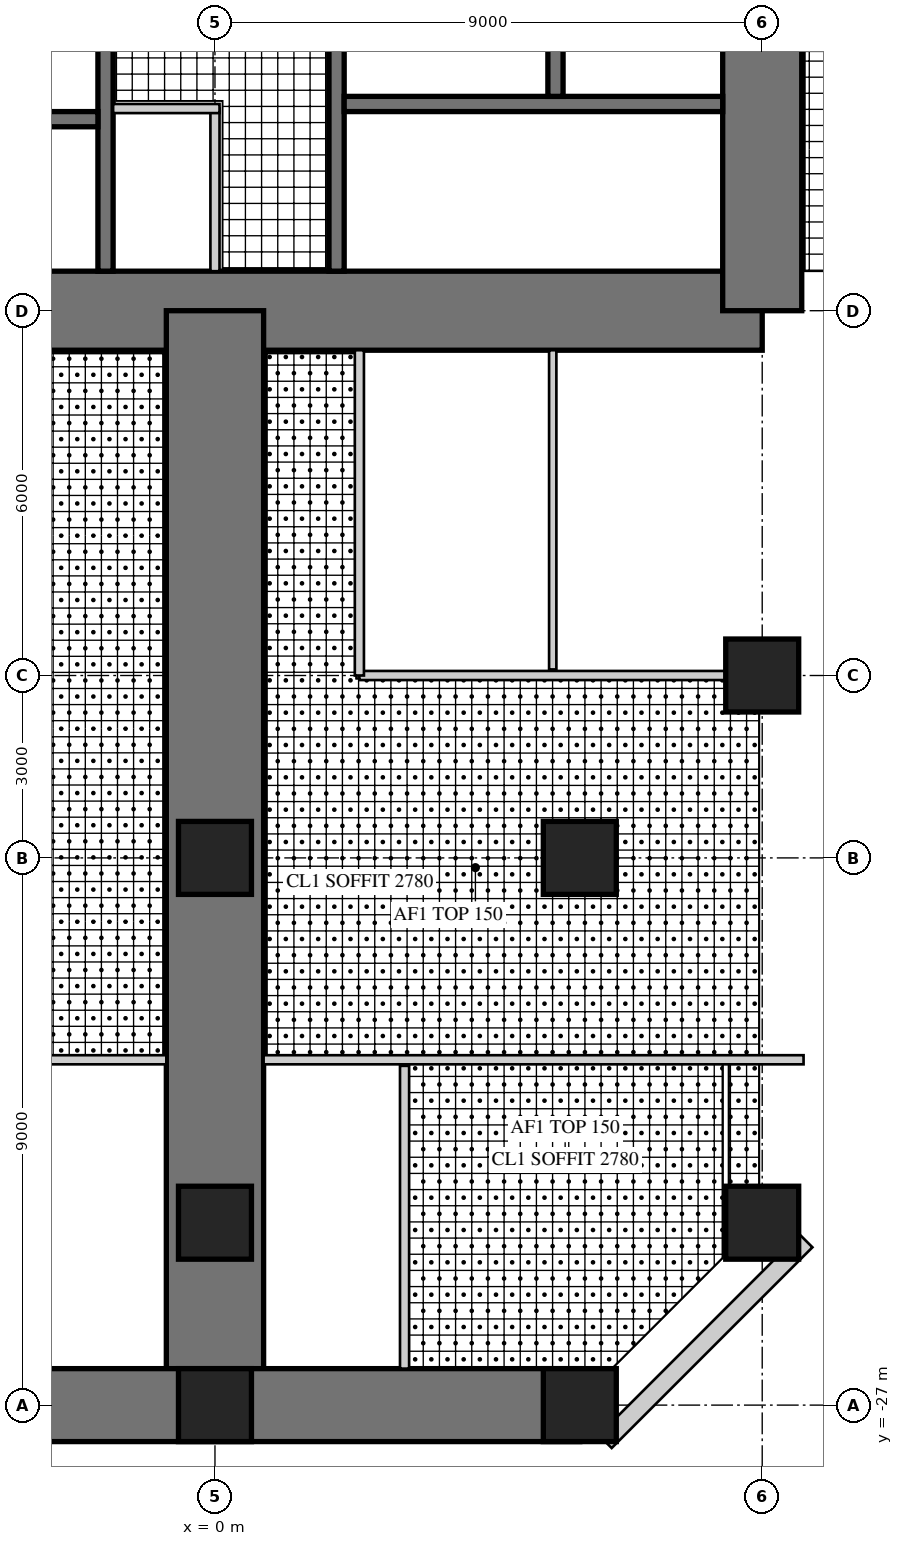
"""IFC4 building model, lengths in metres.
Left out: names, types, materials, properties, quantities, classifications, styles, units other than length and angle.
Written with IfcOpenShell. Run it as: python <this file> out.ifc"""

import sys

from ifc_helpers import new_model, si_unit, direction, frame, frame_2d, origin, origin_2d, place, context, subcontext, project, spatial, rectangle, hollow_rectangle, extrude, element, fill, save


model = new_model("IFC4")
c1 = context("Model", 3, precision=1e-05, world=origin(), true_north=direction((0.0, 1.0)))
c2 = subcontext(c1, "Body", "Model", "MODEL_VIEW")
j1 = project(units=[si_unit("LENGTHUNIT", "METRE"), si_unit("PLANEANGLEUNIT", "RADIAN")], contexts=[c1])
p1 = place(None, origin())
s1 = spatial("IfcSite", under=j1, at=p1, CompositionType="ELEMENT")
p2 = place(p1, origin())
s2 = spatial("IfcBuilding", under=s1, at=p2, CompositionType="ELEMENT")
p3 = place(p2, frame((0.0, 0.0, 27.5)))
s3 = spatial("IfcBuildingStorey", under=s2, at=p3, CompositionType="ELEMENT", Elevation=27.5)
p4 = place(p3, frame((-9.0, -9.0, 0.0), z_axis=(0.0, 0.0, 1.0), x_axis=(1.0, 0.0, 0.0)))
e1 = element("IfcWall", 1, at=p4, inside=s3, PredefinedType="SHEAR", context=c2, shape_type="SweptSolid", body=[
    extrude(rectangle(XDim=18.0, YDim=1.3, at=frame_2d((9.0, 0.0))), origin(), (0.0, 0.0, 1.0), 4.0),
])
p5 = place(p4, frame((9.8, 0.0, 0.0)))
e2 = element("IfcOpeningElement", 2, at=p5, cuts=e1, PredefinedType="OPENING", context=c2, shape_type="SweptSolid", body=[
    extrude(rectangle(XDim=1.0, YDim=2.4, at=frame_2d((0.5, 1.2))), frame((0.0, 0.66, 0.0), z_axis=(0.0, -1.0, 0.0), x_axis=(1.0, 0.0, 0.0)), (0.0, 0.0, 1.0), 1.32),
])
p6 = place(p3, frame((9.0, -9.0, 0.0), z_axis=(0.0, 0.0, 1.0), x_axis=(0.0, 1.0, 0.0)))
e3 = element("IfcWall", 3, at=p6, inside=s3, PredefinedType="SHEAR", context=c2, shape_type="SweptSolid", body=[
    extrude(rectangle(XDim=18.0, YDim=1.3, at=frame_2d((9.0, 0.0))), origin(), (0.0, 0.0, 1.0), 4.0),
])
p7 = place(p6, frame((9.8, 0.0, 0.0)))
e4 = element("IfcOpeningElement", 4, at=p7, cuts=e3, PredefinedType="OPENING", context=c2, shape_type="SweptSolid", body=[
    extrude(rectangle(XDim=1.0, YDim=2.4, at=frame_2d((0.5, 1.2))), frame((0.0, 0.66, 0.0), z_axis=(0.0, -1.0, 0.0), x_axis=(1.0, 0.0, 0.0)), (0.0, 0.0, 1.0), 1.32),
])
p8 = place(p3, frame((-1.8, -1.875, 0.0), z_axis=(0.0, 0.0, 1.0), x_axis=(0.0, -1.0, 0.0)))
e5 = element("IfcWall", 5, at=p8, inside=s3, PredefinedType="SHEAR", context=c2, shape_type="SweptSolid", body=[
    extrude(rectangle(XDim=6.475, YDim=0.25, at=frame_2d((3.238, 0.0))), origin(), (0.0, 0.0, 1.0), 4.0),
])
p9 = place(p8, frame((1.875, 0.0, 0.0)))
e6 = element("IfcOpeningElement", 6, at=p9, cuts=e5, PredefinedType="OPENING", context=c2, shape_type="SweptSolid", body=[
    extrude(rectangle(XDim=1.6, YDim=2.4, at=frame_2d((0.8, 1.2))), frame((0.0, 0.135, 0.0), z_axis=(0.0, -1.0, 0.0), x_axis=(1.0, 0.0, 0.0)), (0.0, 0.0, 1.0), 0.27),
])
p10 = place(p3, frame((-1.925, -5.85, 0.0), z_axis=(0.0, 0.0, 1.0), x_axis=(-1.0, 0.0, 0.0)))
e7 = element("IfcWall", 7, at=p10, inside=s3, PredefinedType="SHEAR", context=c2, shape_type="SweptSolid", body=[
    extrude(rectangle(XDim=6.425, YDim=0.25, at=frame_2d((3.212, 0.0))), origin(), (0.0, 0.0, 1.0), 4.0),
])
p11 = place(p3, frame((2.0, -1.675, 0.0), z_axis=(0.0, 0.0, 1.0), x_axis=(0.0, -1.0, 0.0)))
e8 = element("IfcWall", 8, at=p11, inside=s3, PredefinedType="SHEAR", context=c2, shape_type="SweptSolid", body=[
    extrude(rectangle(XDim=6.675, YDim=0.25, at=frame_2d((3.337, 0.0))), origin(), (0.0, 0.0, 1.0), 4.0),
])
p12 = place(p11, frame((0.725, 0.0, 0.0)))
e9 = element("IfcOpeningElement", 9, at=p12, cuts=e8, PredefinedType="OPENING", context=c2, shape_type="SweptSolid", body=[
    extrude(rectangle(XDim=1.0, YDim=2.1, at=frame_2d((0.5, 1.05))), frame((0.0, 0.135, 0.0), z_axis=(0.0, -1.0, 0.0), x_axis=(1.0, 0.0, 0.0)), (0.0, 0.0, 1.0), 0.27),
])
p13 = place(p3, frame((2.125, -5.6, 0.0), z_axis=(0.0, 0.0, 1.0), x_axis=(1.0, 0.0, 0.0)))
e10 = element("IfcWall", 10, at=p13, inside=s3, PredefinedType="SHEAR", context=c2, shape_type="SweptSolid", body=[
    extrude(rectangle(XDim=6.225, YDim=0.25, at=frame_2d((3.113, 0.0))), origin(), (0.0, 0.0, 1.0), 4.0),
])
p14 = place(p13, frame((0.175, 0.0, 0.0)))
e11 = element("IfcOpeningElement", 11, at=p14, cuts=e10, PredefinedType="OPENING", context=c2, shape_type="SweptSolid", body=[
    extrude(rectangle(XDim=1.0, YDim=2.1, at=frame_2d((0.5, 1.05))), frame((0.0, 0.135, 0.0), z_axis=(0.0, -1.0, 0.0), x_axis=(1.0, 0.0, 0.0)), (0.0, 0.0, 1.0), 0.27),
])
p15 = place(p3, frame((5.6, -1.925, 0.0), z_axis=(0.0, 0.0, 1.0), x_axis=(0.0, -1.0, 0.0)))
e12 = element("IfcWall", 12, at=p15, inside=s3, PredefinedType="SHEAR", context=c2, shape_type="SweptSolid", body=[
    extrude(rectangle(XDim=3.55, YDim=0.25, at=frame_2d((1.775, 0.0))), origin(), (0.0, 0.0, 1.0), 4.0),
])
p16 = place(p15, frame((1.525, 0.0, 0.0)))
e13 = element("IfcOpeningElement", 13, at=p16, cuts=e12, PredefinedType="OPENING", context=c2, shape_type="SweptSolid", body=[
    extrude(rectangle(XDim=1.1, YDim=2.2, at=frame_2d((0.55, 1.1))), frame((0.0, 0.135, 0.0), z_axis=(0.0, -1.0, 0.0), x_axis=(1.0, 0.0, 0.0)), (0.0, 0.0, 1.0), 0.27),
])
p17 = place(p15, frame((0.075, 0.0, 0.0)))
e14 = element("IfcOpeningElement", 14, at=p17, cuts=e12, PredefinedType="OPENING", context=c2, shape_type="SweptSolid", body=[
    extrude(rectangle(XDim=0.8, YDim=2.1, at=frame_2d((0.4, 1.05))), frame((0.0, 0.135, 0.0), z_axis=(0.0, -1.0, 0.0), x_axis=(1.0, 0.0, 0.0)), (0.0, 0.0, 1.0), 0.27),
])
p18 = place(p3, frame((0.0, -9.0, 0.0), z_axis=(0.0, 0.0, 1.0), x_axis=(0.0, -1.0, 0.0)))
e15 = element("IfcWall", 15, at=p18, inside=s3, PredefinedType="SHEAR", context=c2, shape_type="SweptSolid", body=[
    extrude(rectangle(XDim=18.0, YDim=1.6, at=frame_2d((9.0, 0.0))), origin(), (0.0, 0.0, 1.0), 4.0),
])
p19 = place(p18, frame((9.9, 0.0, 0.0)))
e16 = element("IfcOpeningElement", 16, at=p19, cuts=e15, PredefinedType="OPENING", context=c2, shape_type="SweptSolid", body=[
    extrude(rectangle(XDim=1.0, YDim=2.2, at=frame_2d((0.5, 1.1))), frame((0.0, 0.81, 0.0), z_axis=(0.0, -1.0, 0.0), x_axis=(1.0, 0.0, 0.0)), (0.0, 0.0, 1.0), 1.62),
])
p20 = place(p3, frame((-6.0, -27.0, 0.0), z_axis=(0.0, 0.0, 1.0), x_axis=(1.0, 0.0, 0.0)))
e17 = element("IfcWall", 17, at=p20, inside=s3, PredefinedType="SHEAR", context=c2, shape_type="SweptSolid", body=[
    extrude(rectangle(XDim=12.0, YDim=1.2, at=frame_2d((6.0, 0.0))), origin(), (0.0, 0.0, 1.0), 4.0),
])
p21 = place(p20, frame((1.5, 0.0, 0.6)))
e18 = element("IfcOpeningElement", 18, at=p21, cuts=e17, PredefinedType="OPENING", context=c2, shape_type="SweptSolid", body=[
    extrude(rectangle(XDim=3.0, YDim=2.4, at=frame_2d((1.5, 1.2))), frame((0.0, 0.61, 0.0), z_axis=(0.0, -1.0, 0.0), x_axis=(1.0, 0.0, 0.0)), (0.0, 0.0, 1.0), 1.22),
])
p22 = place(p20, frame((7.5, 0.0, 0.6)))
e19 = element("IfcOpeningElement", 19, at=p22, cuts=e17, PredefinedType="OPENING", context=c2, shape_type="SweptSolid", body=[
    extrude(rectangle(XDim=3.0, YDim=2.4, at=frame_2d((1.5, 1.2))), frame((0.0, 0.61, 0.0), z_axis=(0.0, -1.0, 0.0), x_axis=(1.0, 0.0, 0.0)), (0.0, 0.0, 1.0), 1.22),
])
for number, where, z_axis, x_axis in (
    (20, (9.0, -15.0, 0.0), (0.0, 0.0, 1.0), (1.0, 0.0, 0.0)),
    (21, (9.0, -24.0, 0.0), (0.0, 0.0, 1.0), (1.0, 0.0, 0.0)),
    (22, (0.0, -27.0, 0.0), (0.0, 0.0, 1.0), (1.0, 0.0, 0.0)),
    (23, (6.0, -27.0, 0.0), (0.0, 0.0, 1.0), (1.0, 0.0, 0.0)),
    (24, (0.0, -18.0, 0.0), (0.0, 0.0, 1.0), (1.0, 0.0, 0.0)),
    (25, (6.0, -18.0, 0.0), (0.0, 0.0, 1.0), (1.0, 0.0, 0.0)),
    (26, (0.0, -24.0, 0.0), (0.0, 0.0, 1.0), (1.0, 0.0, 0.0)),
):
    element("IfcColumn", number, at=place(p3, frame(where, z_axis=z_axis, x_axis=x_axis)), inside=s3, PredefinedType="COLUMN", context=c2, shape_type="SweptSolid", body=[
        extrude(rectangle(XDim=1.2, YDim=1.2, at=origin_2d()), origin(), (0.0, 0.0, 1.0), 4.0),
    ])
p23 = place(p3, frame((6.418, -27.6, 0.0), z_axis=(0.0, 0.0, 1.0), x_axis=(0.707106781187, 0.707106781187, 0.0)))
e27 = element("IfcWall", 27, at=p23, inside=s3, PredefinedType="SOLIDWALL", context=c2, shape_type="SweptSolid", body=[
    extrude(rectangle(XDim=4.669, YDim=0.3, at=frame_2d((2.335, 0.0))), origin(), (0.0, 0.0, 1.0), 3.8),
])
p24 = place(p23, frame((1.885, 0.0, 0.3)))
e28 = element("IfcOpeningElement", 28, at=p24, cuts=e27, PredefinedType="OPENING", context=c2, shape_type="SweptSolid", body=[
    extrude(rectangle(XDim=0.9, YDim=2.4, at=frame_2d((0.45, 1.2))), frame((0.0, 0.16, 0.0), z_axis=(0.0, -1.0, 0.0), x_axis=(1.0, 0.0, 0.0)), (0.0, 0.0, 1.0), 0.32),
])
p25 = place(p3, frame((0.0, -5.675, 0.0), z_axis=(0.0, 0.0, 1.0), x_axis=(0.0, -1.0, 0.0)))
e29 = element("IfcWall", 29, at=p25, inside=s3, PredefinedType="PARTITIONING", context=c2, shape_type="SweptSolid", body=[
    extrude(rectangle(XDim=2.675, YDim=0.15, at=frame_2d((1.337, 0.0))), origin(), (0.0, 0.0, 1.0), 3.8),
])
p26 = place(p25, frame((0.4, 0.0, 0.0)))
e30 = element("IfcOpeningElement", 30, at=p26, cuts=e29, PredefinedType="OPENING", context=c2, shape_type="SweptSolid", body=[
    extrude(rectangle(XDim=1.0, YDim=2.1, at=frame_2d((0.5, 1.05))), frame((0.0, 0.085, 0.0), z_axis=(0.0, -1.0, 0.0), x_axis=(1.0, 0.0, 0.0)), (0.0, 0.0, 1.0), 0.17),
])
p27 = place(p3, frame((-1.675, -5.675, 0.0), z_axis=(0.0, 0.0, 1.0), x_axis=(1.0, 0.0, 0.0)))
e31 = element("IfcWall", 31, at=p27, inside=s3, PredefinedType="PARTITIONING", context=c2, shape_type="SweptSolid", body=[
    extrude(rectangle(XDim=1.75, YDim=0.15, at=frame_2d((0.875, 0.0))), origin(), (0.0, 0.0, 1.0), 3.8),
])
p28 = place(p3, frame((2.375, -15.0, 0.0), z_axis=(0.0, 0.0, 1.0), x_axis=(1.0, 0.0, 0.0)))
e32 = element("IfcWall", 32, at=p28, inside=s3, PredefinedType="PARTITIONING", context=c2, shape_type="SweptSolid", body=[
    extrude(rectangle(XDim=6.025, YDim=0.15, at=frame_2d((3.012, 0.0))), origin(), (0.0, 0.0, 1.0), 2.95),
])
p29 = place(p28, frame((1.09, 0.0, 0.0)))
e33 = element("IfcOpeningElement", 33, at=p29, cuts=e32, PredefinedType="OPENING", context=c2, shape_type="SweptSolid", body=[
    extrude(rectangle(XDim=1.0, YDim=2.1, at=frame_2d((0.5, 1.05))), frame((0.0, 0.085, 0.0), z_axis=(0.0, -1.0, 0.0), x_axis=(1.0, 0.0, 0.0)), (0.0, 0.0, 1.0), 0.17),
])
p30 = place(p28, frame((4.102, 0.0, 0.0)))
e34 = element("IfcOpeningElement", 34, at=p30, cuts=e32, PredefinedType="OPENING", context=c2, shape_type="SweptSolid", body=[
    extrude(rectangle(XDim=1.0, YDim=2.1, at=frame_2d((0.5, 1.05))), frame((0.0, 0.085, 0.0), z_axis=(0.0, -1.0, 0.0), x_axis=(1.0, 0.0, 0.0)), (0.0, 0.0, 1.0), 0.17),
])
p31 = place(p3, frame((2.375, -9.65, 0.0), z_axis=(0.0, 0.0, 1.0), x_axis=(0.0, -1.0, 0.0)))
e35 = element("IfcWall", 35, at=p31, inside=s3, PredefinedType="PARTITIONING", context=c2, shape_type="SweptSolid", body=[
    extrude(rectangle(XDim=5.35, YDim=0.15, at=frame_2d((2.675, 0.0))), origin(), (0.0, 0.0, 1.0), 3.8),
])
p32 = place(p3, frame((5.555, -9.65, 0.0), z_axis=(0.0, 0.0, 1.0), x_axis=(0.0, -1.0, 0.0)))
e36 = element("IfcWall", 36, at=p32, inside=s3, PredefinedType="PLUMBINGWALL", context=c2, shape_type="SweptSolid", body=[
    extrude(rectangle(XDim=5.25, YDim=0.12, at=frame_2d((2.625, 0.0))), origin(), (0.0, 0.0, 1.0), 3.8),
])
p33 = place(p3, frame((3.118, -21.42, 0.0), z_axis=(0.0, 0.0, 1.0), x_axis=(0.0, -1.0, 0.0)))
e37 = element("IfcWall", 37, at=p33, inside=s3, PredefinedType="PARTITIONING", context=c2, shape_type="SweptSolid", body=[
    extrude(rectangle(XDim=4.98, YDim=0.15, at=frame_2d((2.49, 0.0))), origin(), (0.0, 0.0, 1.0), 3.8),
])
p34 = place(p3, frame((0.8, -21.32, 0.0), z_axis=(0.0, 0.0, 1.0), x_axis=(1.0, 0.0, 0.0)))
e38 = element("IfcWall", 38, at=p34, inside=s3, PredefinedType="PARTITIONING", context=c2, shape_type="SweptSolid", body=[
    extrude(rectangle(XDim=8.88, YDim=0.15, at=frame_2d((4.44, 0.0))), origin(), (0.0, 0.0, 1.0), 3.8),
])
p35 = place(p34, frame((0.35, 0.0, 0.0)))
e39 = element("IfcOpeningElement", 39, at=p35, cuts=e38, PredefinedType="OPENING", context=c2, shape_type="SweptSolid", body=[
    extrude(rectangle(XDim=1.0, YDim=2.2, at=frame_2d((0.5, 1.1))), frame((0.0, 0.085, 0.0), z_axis=(0.0, -1.0, 0.0), x_axis=(1.0, 0.0, 0.0)), (0.0, 0.0, 1.0), 0.17),
])
p36 = place(p34, frame((2.793, 0.0, 0.0)))
e40 = element("IfcOpeningElement", 40, at=p36, cuts=e38, PredefinedType="OPENING", context=c2, shape_type="SweptSolid", body=[
    extrude(rectangle(XDim=1.0, YDim=2.2, at=frame_2d((0.5, 1.1))), frame((0.0, 0.085, 0.0), z_axis=(0.0, -1.0, 0.0), x_axis=(1.0, 0.0, 0.0)), (0.0, 0.0, 1.0), 0.17),
])
p37 = place(p3, frame((-9.68, -21.32, 0.0), z_axis=(0.0, 0.0, 1.0), x_axis=(1.0, 0.0, 0.0)))
e41 = element("IfcWall", 41, at=p37, inside=s3, PredefinedType="PARTITIONING", context=c2, shape_type="SweptSolid", body=[
    extrude(rectangle(XDim=8.88, YDim=0.15, at=frame_2d((4.44, 0.0))), origin(), (0.0, 0.0, 1.0), 3.8),
])
p38 = place(p37, frame((5.087, 0.0, 0.0)))
e42 = element("IfcOpeningElement", 42, at=p38, cuts=e41, PredefinedType="OPENING", context=c2, shape_type="SweptSolid", body=[
    extrude(rectangle(XDim=1.0, YDim=2.2, at=frame_2d((0.5, 1.1))), frame((0.0, 0.085, 0.0), z_axis=(0.0, -1.0, 0.0), x_axis=(1.0, 0.0, 0.0)), (0.0, 0.0, 1.0), 0.17),
])
p39 = place(p37, frame((7.53, 0.0, 0.0)))
e43 = element("IfcOpeningElement", 43, at=p39, cuts=e41, PredefinedType="OPENING", context=c2, shape_type="SweptSolid", body=[
    extrude(rectangle(XDim=1.0, YDim=2.2, at=frame_2d((0.5, 1.1))), frame((0.0, 0.085, 0.0), z_axis=(0.0, -1.0, 0.0), x_axis=(1.0, 0.0, 0.0)), (0.0, 0.0, 1.0), 0.17),
])
p40 = place(p21, origin())
e44 = element("IfcWindow", 44, at=p40, inside=s3, PartitioningType="SINGLE_PANEL", PredefinedType="WINDOW", context=c2, shape_type="SweptSolid", body=[
    extrude(hollow_rectangle(XDim=3.0, YDim=2.4, WallThickness=0.06, at=frame_2d((1.5, 1.2))), frame((0.0, 0.03, 0.0), z_axis=(0.0, -1.0, 0.0), x_axis=(1.0, 0.0, 0.0)), (0.0, 0.0, 1.0), 0.06),
    extrude(rectangle(XDim=2.879, YDim=2.279, at=frame_2d((1.5, 1.2))), frame((0.0, 0.03, 0.0), z_axis=(0.0, -1.0, 0.0), x_axis=(1.0, 0.0, 0.0)), (0.0, 0.0, 1.0), 0.06),
])
fill(e18, e44)
p41 = place(p22, origin())
e45 = element("IfcWindow", 45, at=p41, inside=s3, PartitioningType="SINGLE_PANEL", PredefinedType="WINDOW", context=c2, shape_type="SweptSolid", body=[
    extrude(hollow_rectangle(XDim=3.0, YDim=2.4, WallThickness=0.06, at=frame_2d((1.5, 1.2))), frame((0.0, 0.03, 0.0), z_axis=(0.0, -1.0, 0.0), x_axis=(1.0, 0.0, 0.0)), (0.0, 0.0, 1.0), 0.06),
    extrude(rectangle(XDim=2.879, YDim=2.279, at=frame_2d((1.5, 1.2))), frame((0.0, 0.03, 0.0), z_axis=(0.0, -1.0, 0.0), x_axis=(1.0, 0.0, 0.0)), (0.0, 0.0, 1.0), 0.06),
])
fill(e19, e45)
p42 = place(p24, origin())
e46 = element("IfcWindow", 46, at=p42, inside=s3, PartitioningType="SINGLE_PANEL", PredefinedType="WINDOW", context=c2, shape_type="SweptSolid", body=[
    extrude(hollow_rectangle(XDim=0.9, YDim=2.4, WallThickness=0.06, at=frame_2d((0.45, 1.2))), frame((0.0, 0.03, 0.0), z_axis=(0.0, -1.0, 0.0), x_axis=(1.0, 0.0, 0.0)), (0.0, 0.0, 1.0), 0.06),
    extrude(rectangle(XDim=0.779, YDim=2.279, at=frame_2d((0.45, 1.2))), frame((0.0, 0.03, 0.0), z_axis=(0.0, -1.0, 0.0), x_axis=(1.0, 0.0, 0.0)), (0.0, 0.0, 1.0), 0.06),
])
fill(e28, e46)
p43 = place(p26, frame((1.0, 0.0, 0.0), z_axis=(0.0, 0.0, 1.0), x_axis=(-1.0, 0.0, 0.0)))
e47 = element("IfcDoor", 47, at=p43, inside=s3, OperationType="SINGLE_SWING_RIGHT", PredefinedType="DOOR", context=c2, shape_type="SweptSolid", body=[
    extrude(rectangle(XDim=1.0, YDim=2.1, at=frame_2d((0.5, 1.05))), frame((0.0, 0.025, 0.0), z_axis=(0.0, -1.0, 0.0), x_axis=(1.0, 0.0, 0.0)), (0.0, 0.0, 1.0), 0.05),
])
fill(e30, e47)
p44 = place(p29, origin())
e48 = element("IfcDoor", 48, at=p44, inside=s3, OperationType="SINGLE_SWING_LEFT", PredefinedType="DOOR", context=c2, shape_type="SweptSolid", body=[
    extrude(rectangle(XDim=1.0, YDim=2.1, at=frame_2d((0.5, 1.05))), frame((0.0, 0.025, 0.0), z_axis=(0.0, -1.0, 0.0), x_axis=(1.0, 0.0, 0.0)), (0.0, 0.0, 1.0), 0.05),
])
fill(e33, e48)
p45 = place(p30, origin())
e49 = element("IfcDoor", 49, at=p45, inside=s3, OperationType="SINGLE_SWING_LEFT", PredefinedType="DOOR", context=c2, shape_type="SweptSolid", body=[
    extrude(rectangle(XDim=1.0, YDim=2.1, at=frame_2d((0.5, 1.05))), frame((0.0, 0.025, 0.0), z_axis=(0.0, -1.0, 0.0), x_axis=(1.0, 0.0, 0.0)), (0.0, 0.0, 1.0), 0.05),
])
fill(e34, e49)
p46 = place(p35, frame((1.0, 0.0, 0.0), z_axis=(0.0, 0.0, 1.0), x_axis=(-1.0, 0.0, 0.0)))
e50 = element("IfcDoor", 50, at=p46, inside=s3, OperationType="SINGLE_SWING_RIGHT", PredefinedType="DOOR", context=c2, shape_type="SweptSolid", body=[
    extrude(rectangle(XDim=1.0, YDim=2.2, at=frame_2d((0.5, 1.1))), frame((0.0, 0.025, 0.0), z_axis=(0.0, -1.0, 0.0), x_axis=(1.0, 0.0, 0.0)), (0.0, 0.0, 1.0), 0.05),
])
fill(e39, e50)
p47 = place(p36, frame((1.0, 0.0, 0.0), z_axis=(0.0, 0.0, 1.0), x_axis=(-1.0, 0.0, 0.0)))
e51 = element("IfcDoor", 51, at=p47, inside=s3, OperationType="SINGLE_SWING_RIGHT", PredefinedType="DOOR", context=c2, shape_type="SweptSolid", body=[
    extrude(rectangle(XDim=1.0, YDim=2.2, at=frame_2d((0.5, 1.1))), frame((0.0, 0.025, 0.0), z_axis=(0.0, -1.0, 0.0), x_axis=(1.0, 0.0, 0.0)), (0.0, 0.0, 1.0), 0.05),
])
fill(e40, e51)
p48 = place(p39, frame((1.0, 0.0, 0.0), z_axis=(0.0, 0.0, 1.0), x_axis=(-1.0, 0.0, 0.0)))
e52 = element("IfcDoor", 52, at=p48, inside=s3, OperationType="SINGLE_SWING_LEFT", PredefinedType="DOOR", context=c2, shape_type="SweptSolid", body=[
    extrude(rectangle(XDim=1.0, YDim=2.2, at=frame_2d((0.5, 1.1))), frame((0.0, 0.025, 0.0), z_axis=(0.0, -1.0, 0.0), x_axis=(1.0, 0.0, 0.0)), (0.0, 0.0, 1.0), 0.05),
])
fill(e43, e52)
p49 = place(p19, origin())
e53 = element("IfcDoor", 53, at=p49, inside=s3, OperationType="SINGLE_SWING_RIGHT", PredefinedType="DOOR", context=c2, shape_type="SweptSolid", body=[
    extrude(rectangle(XDim=1.0, YDim=2.2, at=frame_2d((0.5, 1.1))), frame((0.0, 0.025, 0.0), z_axis=(0.0, -1.0, 0.0), x_axis=(1.0, 0.0, 0.0)), (0.0, 0.0, 1.0), 0.05),
])
fill(e16, e53)
p50 = place(p5, frame((1.0, 0.0, 0.0), z_axis=(0.0, 0.0, 1.0), x_axis=(-1.0, 0.0, 0.0)))
e54 = element("IfcDoor", 54, at=p50, inside=s3, OperationType="SINGLE_SWING_RIGHT", PredefinedType="DOOR", context=c2, shape_type="SweptSolid", body=[
    extrude(rectangle(XDim=1.0, YDim=2.4, at=frame_2d((0.5, 1.2))), frame((0.0, -0.005, 0.0), z_axis=(0.0, -1.0, 0.0), x_axis=(1.0, 0.0, 0.0)), (0.0, 0.0, 1.0), 0.05),
])
fill(e2, e54)
p51 = place(p9, frame((1.6, 0.0, 0.0), z_axis=(0.0, 0.0, 1.0), x_axis=(-1.0, 0.0, 0.0)))
e55 = element("IfcDoor", 55, at=p51, inside=s3, OperationType="DOUBLE_DOOR_SINGLE_SWING", PredefinedType="DOOR", context=c2, shape_type="SweptSolid", body=[
    extrude(rectangle(XDim=1.6, YDim=2.4, at=frame_2d((0.8, 1.2))), frame((0.0, 0.025, 0.0), z_axis=(0.0, -1.0, 0.0), x_axis=(1.0, 0.0, 0.0)), (0.0, 0.0, 1.0), 0.05),
])
fill(e6, e55)
p52 = place(p14, frame((1.0, 0.0, 0.0), z_axis=(0.0, 0.0, 1.0), x_axis=(-1.0, 0.0, 0.0)))
e56 = element("IfcDoor", 56, at=p52, inside=s3, OperationType="SINGLE_SWING_RIGHT", PredefinedType="DOOR", context=c2, shape_type="SweptSolid", body=[
    extrude(rectangle(XDim=1.0, YDim=2.1, at=frame_2d((0.5, 1.05))), frame((0.0, 0.025, 0.0), z_axis=(0.0, -1.0, 0.0), x_axis=(1.0, 0.0, 0.0)), (0.0, 0.0, 1.0), 0.05),
])
fill(e11, e56)
save(model, sys.argv[1])
